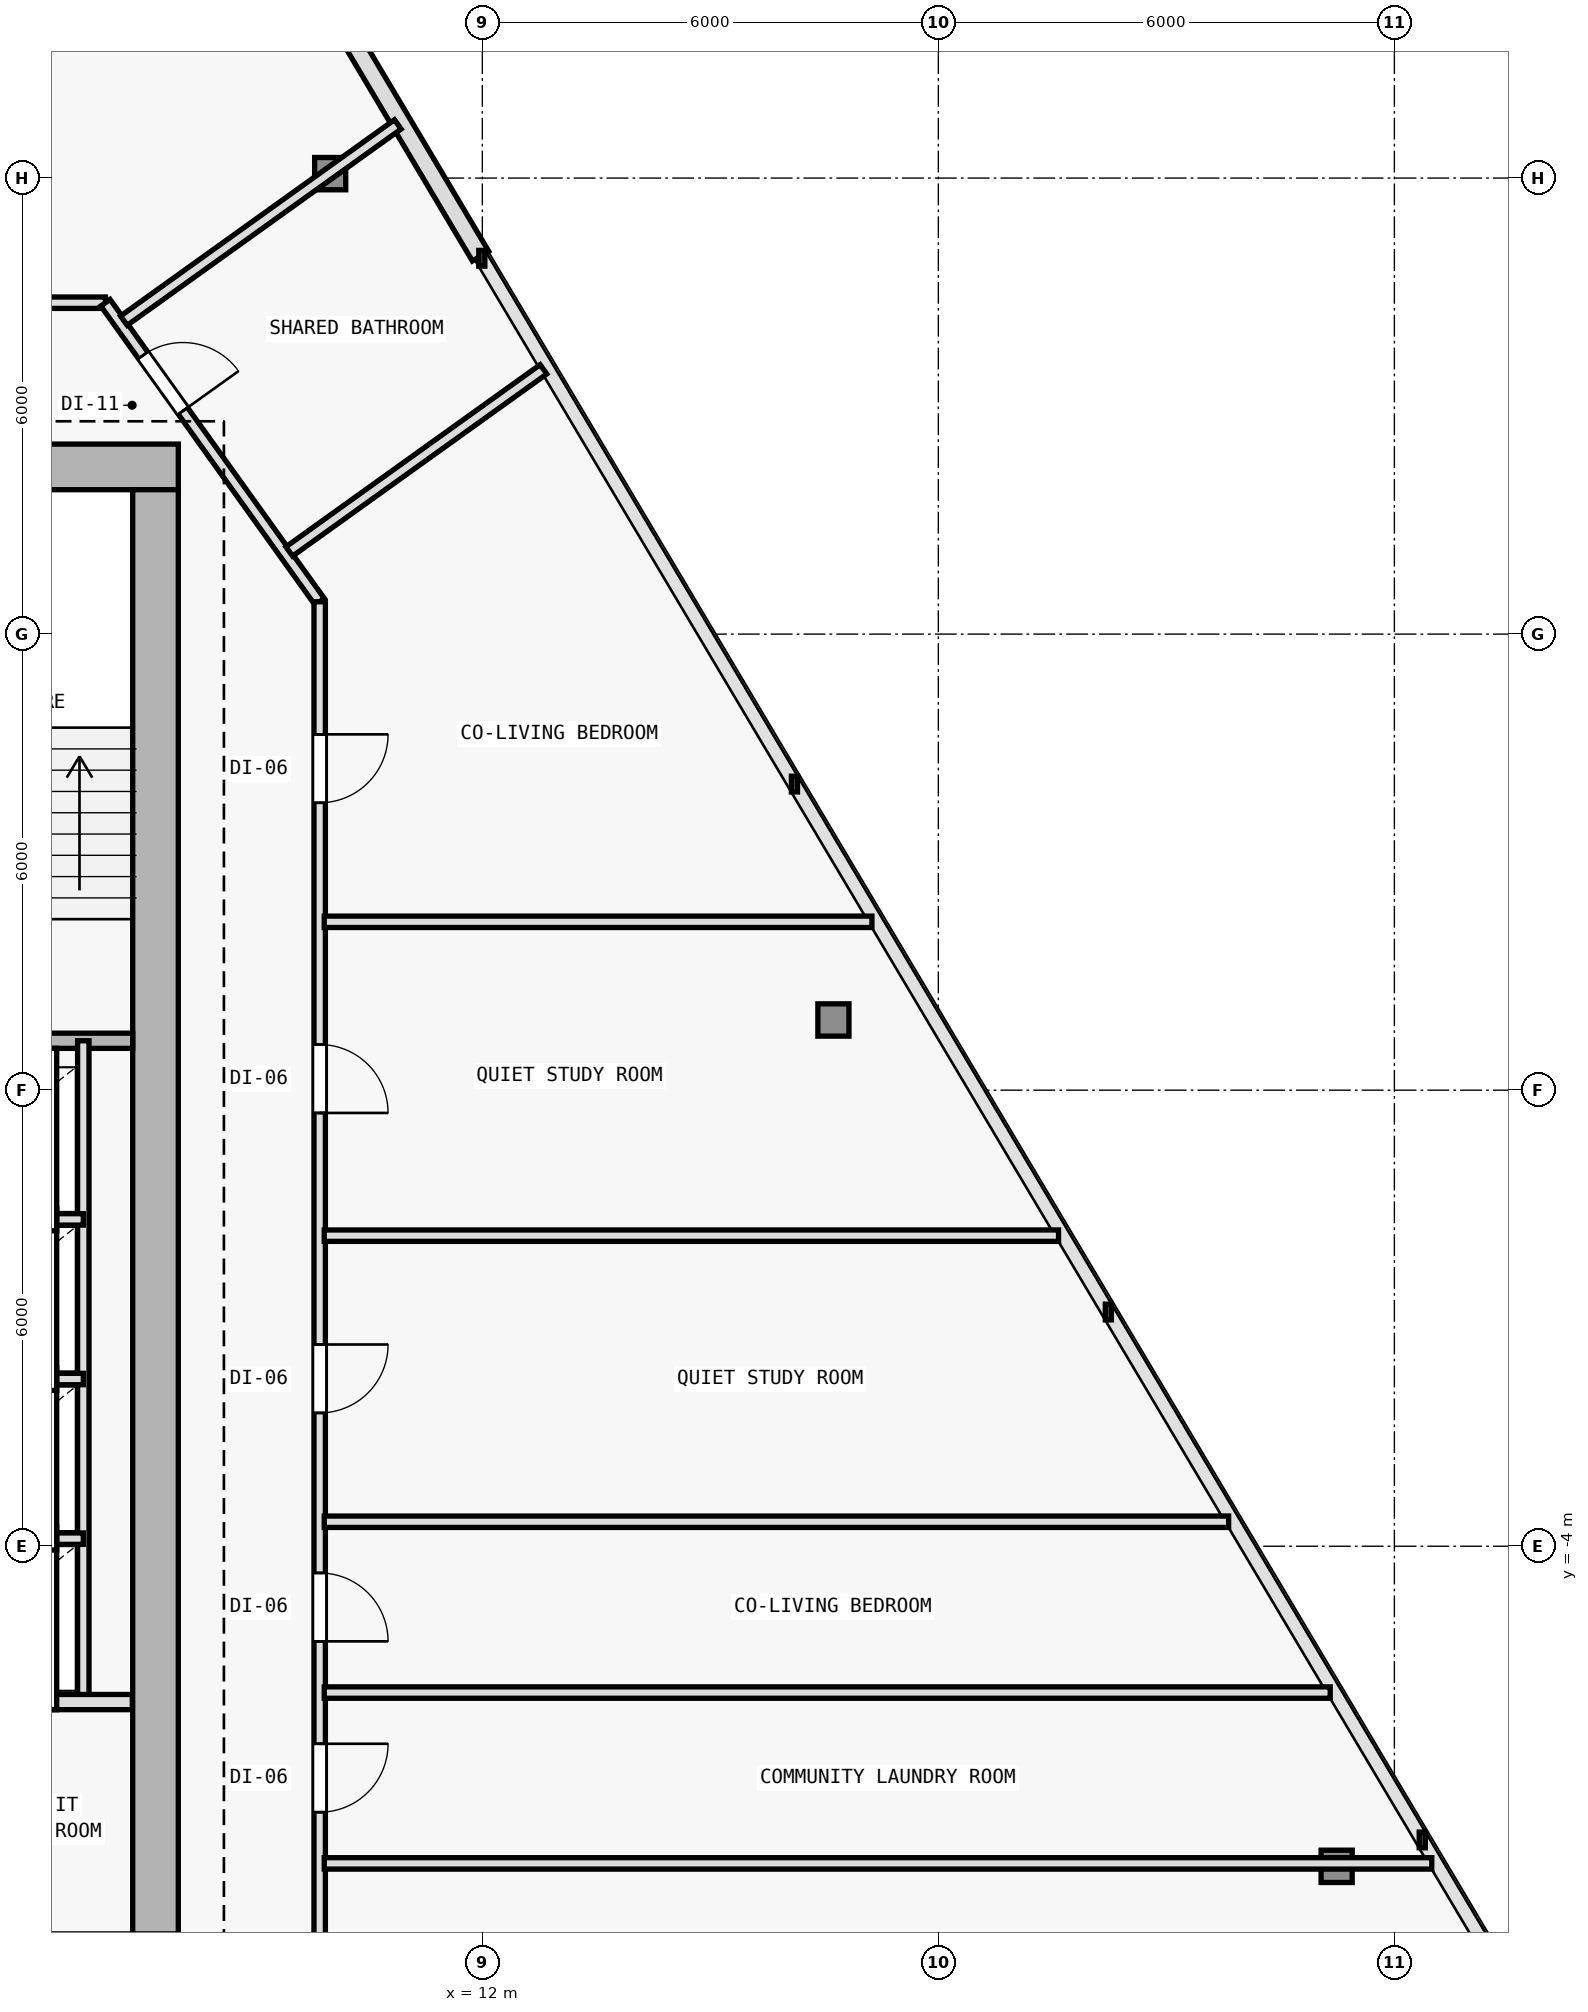
"""IFC4 building model, lengths in metres.
Left out: names, types, materials, properties, quantities, classifications, styles, units other than length and angle.
Written with IfcOpenShell. Run it as: python <this file> out.ifc"""

import sys

from ifc_helpers import new_model, si_unit, direction, frame, frame_2d, origin, origin_2d, place, context, subcontext, project, spatial, rectangle, i_section, extrude, element, fill, save


model = new_model("IFC4")
c1 = context("Model", 3, precision=1e-05, world=origin(), true_north=direction((0.0, 1.0)))
c2 = subcontext(c1, "Body", "Model", "MODEL_VIEW")
j1 = project(units=[si_unit("LENGTHUNIT", "METRE"), si_unit("PLANEANGLEUNIT", "RADIAN")], contexts=[c1])
p1 = place(None, origin())
s1 = spatial("IfcSite", under=j1, at=p1, CompositionType="ELEMENT")
p2 = place(p1, origin())
s2 = spatial("IfcBuilding", under=s1, at=p2, CompositionType="ELEMENT")
p3 = place(p2, frame((0.0, 0.0, 104.1)))
s3 = spatial("IfcBuildingStorey", under=s2, at=p3, CompositionType="ELEMENT", Elevation=104.1)
for number, where, z_axis, x_axis in (
    (1, (7.7, 10.2, 0.0), (0.0, 0.0, 1.0), (1.0, 0.0, 0.0)),
    (2, (7.7, 0.4, 0.0), (0.0, 0.0, 1.0), (1.0, 0.0, 0.0)),
):
    element("IfcColumn", number, at=place(p3, frame(where, z_axis=z_axis, x_axis=x_axis)), inside=s3, PredefinedType="COLUMN", context=c2, shape_type="SweptSolid", body=[
        extrude(i_section(OverallWidth=0.409, OverallDepth=0.425, WebThickness=0.021, FlangeThickness=0.034, FilletRadius=0.015, at=origin_2d()), origin(), (0.0, 0.0, 1.0), 3.6),
    ])
p4 = place(p3, frame((23.24, -8.211, 0.005), z_axis=(-0.026105701351, 0.021550800334, 0.999426863438), x_axis=(-0.636621915226, -0.771176073964, 0.0)))
e3 = element("IfcColumn", 3, at=p4, inside=s3, PredefinedType="COLUMN", context=c2, shape_type="SweptSolid", body=[
    extrude(i_section(OverallWidth=0.409, OverallDepth=0.425, WebThickness=0.021, FlangeThickness=0.034, FilletRadius=0.015, at=origin_2d()), origin(), (0.0, 0.0, 1.0), 3.591),
])
p5 = place(p3, frame((16.619, 2.924, 0.005), z_axis=(-0.018906041, 0.009521027842, 0.999775930718), x_axis=(-0.449781931574, -0.893138406984, 0.0)))
e4 = element("IfcColumn", 4, at=p5, inside=s3, PredefinedType="COLUMN", context=c2, shape_type="SweptSolid", body=[
    extrude(i_section(OverallWidth=0.409, OverallDepth=0.425, WebThickness=0.021, FlangeThickness=0.034, FilletRadius=0.015, at=origin_2d()), origin(), (0.0, 0.0, 1.0), 3.59),
])
p6 = place(p3, frame((9.998, 14.058, 0.005), z_axis=(-0.011699046613, -0.002516655376, 0.999928396814), x_axis=(0.210305364179, -0.977635746993, 0.0)))
e5 = element("IfcColumn", 5, at=p6, inside=s3, PredefinedType="COLUMN", context=c2, shape_type="SweptSolid", body=[
    extrude(i_section(OverallWidth=0.409, OverallDepth=0.425, WebThickness=0.021, FlangeThickness=0.034, FilletRadius=0.015, at=origin_2d()), origin(), (0.0, 0.0, 1.0), 3.589),
])
p7 = place(p3, frame((6.172, 22.734, 0.0), z_axis=(0.0, 0.0, 1.0), x_axis=(0.511105869751, -0.859517765905, 0.0)))
e6 = element("IfcWall", 6, at=p7, inside=s3, PredefinedType="SOLIDWALL", context=c2, shape_type="SweptSolid", body=[
    extrude(rectangle(XDim=11.357, YDim=0.25, at=frame_2d((5.678, 0.0))), origin(), (0.0, 0.0, 1.0), 3.35),
])
p8 = place(p7, frame((4.979, 0.0, 0.62)))
e7 = element("IfcOpeningElement", 7, at=p8, cuts=e6, PredefinedType="OPENING", context=c2, shape_type="SweptSolid", body=[
    extrude(rectangle(XDim=1.4, YDim=2.0, at=frame_2d((0.7, 1.0))), frame((0.0, 0.135, 0.0), z_axis=(0.0, -1.0, 0.0), x_axis=(1.0, 0.0, 0.0)), (0.0, 0.0, 1.0), 0.27),
])
p9 = place(p3, frame((8.0, 10.2, 0.0), z_axis=(0.0, 0.0, 1.0), x_axis=(-1.0, 0.0, 0.0)))
e8 = element("IfcWall", 8, at=p9, inside=s3, PredefinedType="SHEAR", context=c2, shape_type="SweptSolid", body=[
    extrude(rectangle(XDim=16.0, YDim=0.6, at=frame_2d((8.0, 0.0))), origin(), (0.0, 0.0, 1.0), 3.35),
])
p10 = place(p9, frame((4.45, 0.0, 0.0)))
e9 = element("IfcOpeningElement", 9, at=p10, cuts=e8, PredefinedType="OPENING", context=c2, shape_type="SweptSolid", body=[
    extrude(rectangle(XDim=1.1, YDim=2.15, at=frame_2d((0.55, 1.075))), frame((0.0, 0.31, 0.0), z_axis=(0.0, -1.0, 0.0), x_axis=(1.0, 0.0, 0.0)), (0.0, 0.0, 1.0), 0.62),
])
p11 = place(p3, frame((7.7, 9.9, 0.0), z_axis=(0.0, 0.0, 1.0), x_axis=(0.0, -1.0, 0.0)))
e10 = element("IfcWall", 10, at=p11, inside=s3, PredefinedType="SHEAR", context=c2, shape_type="SweptSolid", body=[
    extrude(rectangle(XDim=19.0, YDim=0.6, at=frame_2d((9.5, 0.0))), origin(), (0.0, 0.0, 1.0), 3.35),
])
p12 = place(p3, frame((4.05, 2.65, 0.0), z_axis=(0.0, 0.0, 1.0), x_axis=(1.0, 0.0, 0.0)))
e11 = element("IfcWall", 11, at=p12, inside=s3, PredefinedType="SOLIDWALL", context=c2, shape_type="SweptSolid", body=[
    extrude(rectangle(XDim=3.35, YDim=0.2, at=frame_2d((1.675, 0.0))), origin(), (0.0, 0.0, 1.0), 3.35),
])
p13 = place(p3, frame((6.75, -6.05, 0.0), z_axis=(0.0, 0.0, 1.0), x_axis=(0.0, 1.0, 0.0)))
e12 = element("IfcWall", 12, at=p13, inside=s3, PredefinedType="PARTITIONING", context=c2, shape_type="SweptSolid", body=[
    extrude(rectangle(XDim=8.7, YDim=0.15, at=frame_2d((4.35, 0.0))), origin(), (0.0, 0.0, 1.0), 3.35),
])
for number, where, z_axis, x_axis in (
    (13, (4.15, -3.9, 0.0), (0.0, 0.0, 1.0), (1.0, 0.0, 0.0)),
    (14, (4.15, -1.8, 0.0), (0.0, 0.0, 1.0), (1.0, 0.0, 0.0)),
    (15, (4.15, 0.3, 0.0), (0.0, 0.0, 1.0), (1.0, 0.0, 0.0)),
):
    element("IfcWall", number, at=place(p3, frame(where, z_axis=z_axis, x_axis=x_axis)), inside=s3, PredefinedType="PARTITIONING", context=c2, shape_type="SweptSolid", body=[
        extrude(rectangle(XDim=2.6, YDim=0.15, at=frame_2d((1.3, 0.0))), origin(), (0.0, 0.0, 1.0), 3.35),
    ])
p14 = place(p3, frame((4.15, -6.05, 0.0), z_axis=(0.0, 0.0, 1.0), x_axis=(1.0, 0.0, 0.0)))
e16 = element("IfcWall", 16, at=p14, inside=s3, PredefinedType="SOLIDWALL", context=c2, shape_type="SweptSolid", body=[
    extrude(rectangle(XDim=3.245, YDim=0.2, at=frame_2d((1.623, 0.0))), origin(), (0.0, 0.0, 1.0), 3.35),
])
p15 = place(p3, frame((-7.041, 12.36, 0.0), z_axis=(0.0, 0.0, 1.0), x_axis=(1.0, 0.0, 0.0)))
e17 = element("IfcWall", 17, at=p15, inside=s3, PredefinedType="PARTITIONING", context=c2, shape_type="SweptSolid", body=[
    extrude(rectangle(XDim=14.082, YDim=0.15, at=frame_2d((7.041, 0.0))), origin(), (0.0, 0.0, 1.0), 3.35),
])
p16 = place(p15, frame((6.591, 0.0, 0.0)))
e18 = element("IfcOpeningElement", 18, at=p16, cuts=e17, PredefinedType="OPENING", context=c2, shape_type="SweptSolid", body=[
    extrude(rectangle(XDim=0.9, YDim=2.1, at=frame_2d((0.45, 1.05))), frame((0.0, 0.085, 0.0), z_axis=(0.0, -1.0, 0.0), x_axis=(1.0, 0.0, 0.0)), (0.0, 0.0, 1.0), 0.17),
])
p17 = place(p3, frame((7.041, 12.36, 0.0), z_axis=(0.0, 0.0, 1.0), x_axis=(0.582449511476, -0.812866881218, 0.0)))
e19 = element("IfcWall", 19, at=p17, inside=s3, PredefinedType="PARTITIONING", context=c2, shape_type="SweptSolid", body=[
    extrude(rectangle(XDim=4.84, YDim=0.15, at=frame_2d((2.42, 0.0))), origin(), (0.0, 0.0, 1.0), 2.965),
])
p18 = place(p17, frame((0.851, 0.0, 0.0)))
e20 = element("IfcOpeningElement", 20, at=p18, cuts=e19, PredefinedType="OPENING", context=c2, shape_type="SweptSolid", body=[
    extrude(rectangle(XDim=0.9, YDim=2.1, at=frame_2d((0.45, 1.05))), frame((0.0, 0.085, 0.0), z_axis=(0.0, -1.0, 0.0), x_axis=(1.0, 0.0, 0.0)), (0.0, 0.0, 1.0), 0.17),
])
p19 = place(p3, frame((9.86, 8.426, 0.0), z_axis=(0.0, 0.0, 1.0), x_axis=(0.0, -1.0, 0.0)))
e21 = element("IfcWall", 21, at=p19, inside=s3, PredefinedType="PARTITIONING", context=c2, shape_type="SweptSolid", body=[
    extrude(rectangle(XDim=19.986, YDim=0.15, at=frame_2d((9.993, 0.0))), origin(), (0.0, 0.0, 1.0), 2.705),
])
p20 = place(p19, frame((17.753, 0.0, 0.0)))
e22 = element("IfcOpeningElement", 22, at=p20, cuts=e21, PredefinedType="OPENING", context=c2, shape_type="SweptSolid", body=[
    extrude(rectangle(XDim=0.9, YDim=2.1, at=frame_2d((0.45, 1.05))), frame((0.0, 0.085, 0.0), z_axis=(0.0, -1.0, 0.0), x_axis=(1.0, 0.0, 0.0)), (0.0, 0.0, 1.0), 0.17),
])
p21 = place(p19, frame((15.024, 0.0, 0.0)))
e23 = element("IfcOpeningElement", 23, at=p21, cuts=e21, PredefinedType="OPENING", context=c2, shape_type="SweptSolid", body=[
    extrude(rectangle(XDim=0.9, YDim=2.1, at=frame_2d((0.45, 1.05))), frame((0.0, 0.085, 0.0), z_axis=(0.0, -1.0, 0.0), x_axis=(1.0, 0.0, 0.0)), (0.0, 0.0, 1.0), 0.17),
])
p22 = place(p19, frame((12.777, 0.0, 0.0)))
e24 = element("IfcOpeningElement", 24, at=p22, cuts=e21, PredefinedType="OPENING", context=c2, shape_type="SweptSolid", body=[
    extrude(rectangle(XDim=0.9, YDim=2.1, at=frame_2d((0.45, 1.05))), frame((0.0, 0.085, 0.0), z_axis=(0.0, -1.0, 0.0), x_axis=(1.0, 0.0, 0.0)), (0.0, 0.0, 1.0), 0.17),
])
p23 = place(p19, frame((9.771, 0.0, 0.0)))
e25 = element("IfcOpeningElement", 25, at=p23, cuts=e21, PredefinedType="OPENING", context=c2, shape_type="SweptSolid", body=[
    extrude(rectangle(XDim=0.9, YDim=2.1, at=frame_2d((0.45, 1.05))), frame((0.0, 0.085, 0.0), z_axis=(0.0, -1.0, 0.0), x_axis=(1.0, 0.0, 0.0)), (0.0, 0.0, 1.0), 0.17),
])
p24 = place(p19, frame((5.825, 0.0, 0.0)))
e26 = element("IfcOpeningElement", 26, at=p24, cuts=e21, PredefinedType="OPENING", context=c2, shape_type="SweptSolid", body=[
    extrude(rectangle(XDim=0.9, YDim=2.1, at=frame_2d((0.45, 1.05))), frame((0.0, 0.085, 0.0), z_axis=(0.0, -1.0, 0.0), x_axis=(1.0, 0.0, 0.0)), (0.0, 0.0, 1.0), 0.17),
])
p25 = place(p19, frame((1.744, 0.0, 0.0)))
e27 = element("IfcOpeningElement", 27, at=p25, cuts=e21, PredefinedType="OPENING", context=c2, shape_type="SweptSolid", body=[
    extrude(rectangle(XDim=0.9, YDim=2.1, at=frame_2d((0.45, 1.05))), frame((0.0, 0.085, 0.0), z_axis=(0.0, -1.0, 0.0), x_axis=(1.0, 0.0, 0.0)), (0.0, 0.0, 1.0), 0.17),
])
p26 = place(p3, frame((9.92, -8.173, 0.0), z_axis=(0.0, 0.0, 1.0), x_axis=(1.0, 0.0, 0.0)))
e28 = element("IfcWall", 28, at=p26, inside=s3, PredefinedType="PARTITIONING", context=c2, shape_type="SweptSolid", body=[
    extrude(rectangle(XDim=14.572, YDim=0.15, at=frame_2d((7.286, 0.0))), origin(), (0.0, 0.0, 1.0), 2.705),
])
p27 = place(p3, frame((7.284, 12.124, 0.0), z_axis=(0.0, 0.0, 1.0), x_axis=(0.812861885151, 0.582456483927, 0.0)))
e29 = element("IfcWall", 29, at=p27, inside=s3, PredefinedType="PARTITIONING", context=c2, shape_type="SweptSolid", body=[
    extrude(rectangle(XDim=4.433, YDim=0.15, at=frame_2d((2.217, 0.0))), origin(), (0.0, 0.0, 1.0), 2.835),
])
p28 = place(p3, frame((9.92, 0.086, 0.0), z_axis=(0.0, 0.0, 1.0), x_axis=(1.0, 0.0, 0.0)))
e30 = element("IfcWall", 30, at=p28, inside=s3, PredefinedType="PARTITIONING", context=c2, shape_type="SweptSolid", body=[
    extrude(rectangle(XDim=9.661, YDim=0.15, at=frame_2d((4.831, 0.0))), origin(), (0.0, 0.0, 1.0), 2.835),
])
p29 = place(p3, frame((9.92, -3.678, 0.0), z_axis=(0.0, 0.0, 1.0), x_axis=(1.0, 0.0, 0.0)))
e31 = element("IfcWall", 31, at=p29, inside=s3, PredefinedType="PARTITIONING", context=c2, shape_type="SweptSolid", body=[
    extrude(rectangle(XDim=11.899, YDim=0.15, at=frame_2d((5.95, 0.0))), origin(), (0.0, 0.0, 1.0), 2.835),
])
p30 = place(p3, frame((9.92, 4.215, 0.0), z_axis=(0.0, 0.0, 1.0), x_axis=(1.0, 0.0, 0.0)))
e32 = element("IfcWall", 32, at=p30, inside=s3, PredefinedType="PARTITIONING", context=c2, shape_type="SweptSolid", body=[
    extrude(rectangle(XDim=7.206, YDim=0.15, at=frame_2d((3.603, 0.0))), origin(), (0.0, 0.0, 1.0), 2.835),
])
p31 = place(p3, frame((9.46, 9.087, 0.0), z_axis=(0.0, 0.0, 1.0), x_axis=(0.812890639248, 0.582416353327, 0.0)))
e33 = element("IfcWall", 33, at=p31, inside=s3, PredefinedType="PARTITIONING", context=c2, shape_type="SweptSolid", body=[
    extrude(rectangle(XDim=4.114, YDim=0.15, at=frame_2d((2.057, 0.0))), origin(), (0.0, 0.0, 1.0), 2.835),
])
p32 = place(p3, frame((9.92, -5.925, 0.0), z_axis=(0.0, 0.0, 1.0), x_axis=(1.0, 0.0, 0.0)))
e34 = element("IfcWall", 34, at=p32, inside=s3, PredefinedType="PARTITIONING", context=c2, shape_type="SweptSolid", body=[
    extrude(rectangle(XDim=13.236, YDim=0.15, at=frame_2d((6.618, 0.0))), origin(), (0.0, 0.0, 1.0), 2.835),
])
p33 = place(p21, origin())
e35 = element("IfcDoor", 35, at=p33, inside=s3, OperationType="SINGLE_SWING_LEFT", PredefinedType="DOOR", context=c2, shape_type="SweptSolid", body=[
    extrude(rectangle(XDim=0.9, YDim=2.1, at=frame_2d((0.45, 1.05))), frame((0.0, 0.025, 0.0), z_axis=(0.0, -1.0, 0.0), x_axis=(1.0, 0.0, 0.0)), (0.0, 0.0, 1.0), 0.05),
])
fill(e23, e35)
p34 = place(p22, origin())
e36 = element("IfcDoor", 36, at=p34, inside=s3, OperationType="SINGLE_SWING_RIGHT", PredefinedType="DOOR", context=c2, shape_type="SweptSolid", body=[
    extrude(rectangle(XDim=0.9, YDim=2.1, at=frame_2d((0.45, 1.05))), frame((0.0, 0.025, 0.0), z_axis=(0.0, -1.0, 0.0), x_axis=(1.0, 0.0, 0.0)), (0.0, 0.0, 1.0), 0.05),
])
fill(e24, e36)
p35 = place(p23, origin())
e37 = element("IfcDoor", 37, at=p35, inside=s3, OperationType="SINGLE_SWING_LEFT", PredefinedType="DOOR", context=c2, shape_type="SweptSolid", body=[
    extrude(rectangle(XDim=0.9, YDim=2.1, at=frame_2d((0.45, 1.05))), frame((0.0, 0.025, 0.0), z_axis=(0.0, -1.0, 0.0), x_axis=(1.0, 0.0, 0.0)), (0.0, 0.0, 1.0), 0.05),
])
fill(e25, e37)
p36 = place(p24, origin())
e38 = element("IfcDoor", 38, at=p36, inside=s3, OperationType="SINGLE_SWING_RIGHT", PredefinedType="DOOR", context=c2, shape_type="SweptSolid", body=[
    extrude(rectangle(XDim=0.9, YDim=2.1, at=frame_2d((0.45, 1.05))), frame((0.0, 0.025, 0.0), z_axis=(0.0, -1.0, 0.0), x_axis=(1.0, 0.0, 0.0)), (0.0, 0.0, 1.0), 0.05),
])
fill(e26, e38)
p37 = place(p25, origin())
e39 = element("IfcDoor", 39, at=p37, inside=s3, OperationType="SINGLE_SWING_LEFT", PredefinedType="DOOR", context=c2, shape_type="SweptSolid", body=[
    extrude(rectangle(XDim=0.9, YDim=2.1, at=frame_2d((0.45, 1.05))), frame((0.0, 0.025, 0.0), z_axis=(0.0, -1.0, 0.0), x_axis=(1.0, 0.0, 0.0)), (0.0, 0.0, 1.0), 0.05),
])
fill(e27, e39)
p38 = place(p18, origin())
e40 = element("IfcDoor", 40, at=p38, inside=s3, OperationType="SINGLE_SWING_RIGHT", PredefinedType="DOOR", context=c2, shape_type="SweptSolid", body=[
    extrude(rectangle(XDim=0.9, YDim=2.1, at=frame_2d((0.45, 1.05))), frame((0.0, 0.025, 0.0), z_axis=(0.0, -1.0, 0.0), x_axis=(1.0, 0.0, 0.0)), (0.0, 0.0, 1.0), 0.05),
])
fill(e20, e40)
save(model, sys.argv[1])
